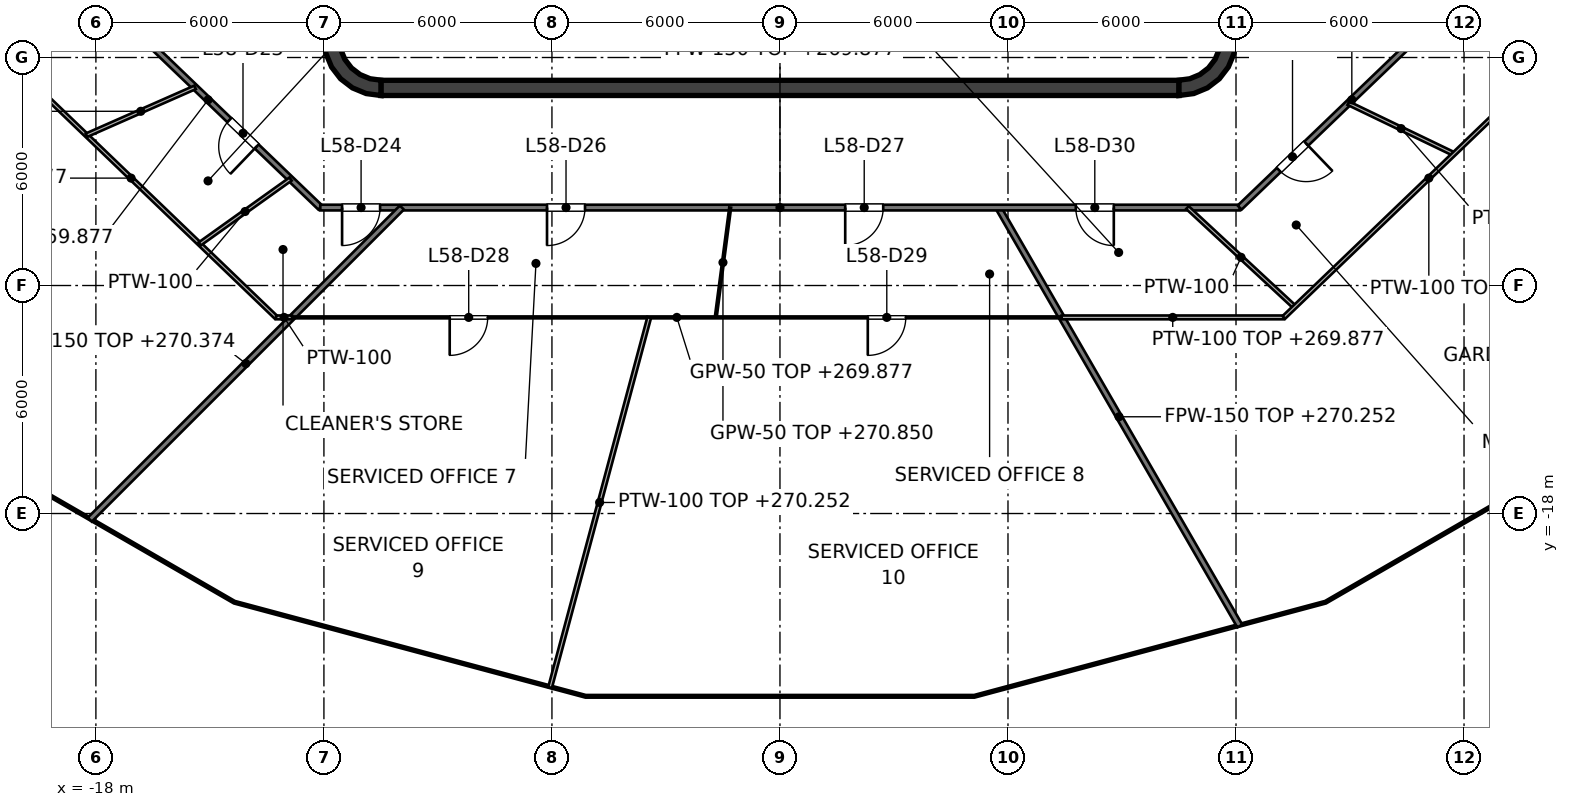
"""IFC4 building model, lengths in metres.
Left out: names, types, materials, properties, quantities, classifications, styles, units other than length and angle.
Written with IfcOpenShell. Run it as: python <this file> out.ifc"""

import sys

from ifc_helpers import new_model, si_unit, direction, frame, frame_2d, origin, place, context, subcontext, project, spatial, polyline, rectangle, outline, extrude, element, fill, save


model = new_model("IFC4")
c1 = context("Model", 3, precision=1e-05, world=origin(), true_north=direction((0.0, 1.0)))
c2 = subcontext(c1, "Body", "Model", "MODEL_VIEW")
j1 = project(units=[si_unit("LENGTHUNIT", "METRE"), si_unit("PLANEANGLEUNIT", "RADIAN")], contexts=[c1])
p1 = place(None, origin())
s1 = spatial("IfcSite", under=j1, at=p1, CompositionType="ELEMENT")
p2 = place(p1, origin())
s2 = spatial("IfcBuilding", under=s1, at=p2, CompositionType="ELEMENT")
p3 = place(p2, frame((0.0, 0.0, 267.0)))
s3 = spatial("IfcBuildingStorey", under=s2, at=p3, CompositionType="ELEMENT", Elevation=267.0)
p4 = place(p3, frame((-10.5, -6.8, 0.0), z_axis=(0.0, 0.0, 1.0), x_axis=(1.0, 0.0, 0.0)))
e1 = element("IfcWall", 1, at=p4, inside=s3, PredefinedType="SHEAR", context=c2, shape_type="SweptSolid", body=[
    extrude(rectangle(XDim=21.0, YDim=0.4, at=frame_2d((10.5, 0.0))), origin(), (0.0, 0.0, 1.0), 4.0),
])
p5 = place(p3, origin())
e2 = element("IfcWall", 2, at=p5, inside=s3, PredefinedType="SHEAR", context=c2, shape_type="SweptSolid", body=[
    extrude(outline(polyline([(-10.5, -7.0), (-10.5, -6.596), (-10.784, -6.559), (-11.048, -6.45), (-11.275, -6.275), (-11.45, -6.048), (-11.559, -5.784), (-11.596, -5.5), (-12.0, -5.5), (-11.949, -5.888), (-11.799, -6.25), (-11.561, -6.561), (-11.25, -6.799), (-10.888, -6.949), (-10.5, -7.0)])), origin(), (0.0, 0.0, 1.0), 4.0),
])
e3 = element("IfcWall", 3, at=p5, inside=s3, PredefinedType="SHEAR", context=c2, shape_type="SweptSolid", body=[
    extrude(outline(polyline([(12.0, -5.5), (11.596, -5.5), (11.559, -5.784), (11.45, -6.048), (11.275, -6.275), (11.048, -6.45), (10.784, -6.559), (10.5, -6.596), (10.5, -7.0), (10.888, -6.949), (11.25, -6.799), (11.561, -6.561), (11.799, -6.25), (11.949, -5.888), (12.0, -5.5)])), origin(), (0.0, 0.0, 1.0), 4.0),
])
p6 = place(p3, frame((1.5, -6.6, 0.0), z_axis=(0.0, 0.0, 1.0), x_axis=(0.0, 1.0, 0.0)))
e4 = element("IfcWall", 4, at=p6, inside=s3, PredefinedType="PARTITIONING", context=c2, shape_type="SweptSolid", body=[
    extrude(rectangle(XDim=2.5, YDim=0.15, at=frame_2d((1.25, 0.0))), origin(), (0.0, 0.0, 1.0), 3.85),
])
p7 = place(p6, frame((0.8, 0.0, 0.0)))
e5 = element("IfcOpeningElement", 5, at=p7, cuts=e4, PredefinedType="OPENING", context=c2, shape_type="SweptSolid", body=[
    extrude(rectangle(XDim=0.9, YDim=2.1, at=frame_2d((0.45, 1.05))), frame((0.0, 0.075, 0.0), z_axis=(0.0, -1.0, 0.0), x_axis=(1.0, 0.0, 0.0)), (0.0, 0.0, 1.0), 0.15),
])
p8 = place(p3, frame((9.0, -6.6, 0.0), z_axis=(0.0, 0.0, 1.0), x_axis=(0.0, 1.0, 0.0)))
e6 = element("IfcWall", 6, at=p8, inside=s3, PredefinedType="SOLIDWALL", context=c2, shape_type="SweptSolid", body=[
    extrude(rectangle(XDim=2.5, YDim=0.25, at=frame_2d((1.25, 0.0))), origin(), (0.0, 0.0, 1.0), 3.85),
])
p9 = place(p8, frame((0.65, 0.0, 0.0)))
e7 = element("IfcOpeningElement", 7, at=p9, cuts=e6, PredefinedType="OPENING", context=c2, shape_type="SweptSolid", body=[
    extrude(rectangle(XDim=1.2, YDim=2.1, at=frame_2d((0.6, 1.05))), frame((0.0, 0.125, 0.0), z_axis=(0.0, -1.0, 0.0), x_axis=(1.0, 0.0, 0.0)), (0.0, 0.0, 1.0), 0.25),
])
p10 = place(p3, frame((-9.0, -6.6, 0.0), z_axis=(0.0, 0.0, 1.0), x_axis=(0.0, 1.0, 0.0)))
e8 = element("IfcWall", 8, at=p10, inside=s3, PredefinedType="PARTITIONING", context=c2, shape_type="SweptSolid", body=[
    extrude(rectangle(XDim=2.5, YDim=0.25, at=frame_2d((1.25, 0.0))), origin(), (0.0, 0.0, 1.0), 3.85),
])
p11 = place(p10, frame((0.75, 0.0, 0.0)))
e9 = element("IfcOpeningElement", 9, at=p11, cuts=e8, PredefinedType="OPENING", context=c2, shape_type="SweptSolid", body=[
    extrude(rectangle(XDim=1.0, YDim=2.1, at=frame_2d((0.5, 1.05))), frame((0.0, 0.125, 0.0), z_axis=(0.0, -1.0, 0.0), x_axis=(1.0, 0.0, 0.0)), (0.0, 0.0, 1.0), 0.25),
])
p12 = place(p3, frame((3.15, -6.6, 0.0), z_axis=(0.0, 0.0, 1.0), x_axis=(0.0, 1.0, 0.0)))
e10 = element("IfcWall", 10, at=p12, inside=s3, PredefinedType="SOLIDWALL", context=c2, shape_type="SweptSolid", body=[
    extrude(rectangle(XDim=2.5, YDim=0.25, at=frame_2d((1.25, 0.0))), origin(), (0.0, 0.0, 1.0), 3.85),
])
p13 = place(p3, frame((-2.9, -6.6, 0.0), z_axis=(0.0, 0.0, 1.0), x_axis=(0.0, 1.0, 0.0)))
e11 = element("IfcWall", 11, at=p13, inside=s3, PredefinedType="PARTITIONING", context=c2, shape_type="SweptSolid", body=[
    extrude(rectangle(XDim=2.5, YDim=0.25, at=frame_2d((1.25, 0.0))), origin(), (0.0, 0.0, 1.0), 3.85),
])
p14 = place(p13, frame((0.8, 0.0, 0.0)))
e12 = element("IfcOpeningElement", 12, at=p14, cuts=e11, PredefinedType="OPENING", context=c2, shape_type="SweptSolid", body=[
    extrude(rectangle(XDim=0.9, YDim=2.1, at=frame_2d((0.45, 1.05))), frame((0.0, 0.125, 0.0), z_axis=(0.0, -1.0, 0.0), x_axis=(1.0, 0.0, 0.0)), (0.0, 0.0, 1.0), 0.25),
])
p15 = place(p3, frame((5.744, -9.949, 0.0), z_axis=(0.0, 0.0, 1.0), x_axis=(0.499937454569, -0.866061511395, 0.0)))
e13 = element("IfcWall", 13, at=p15, inside=s3, PredefinedType="PARTITIONING", context=c2, shape_type="SweptSolid", body=[
    extrude(rectangle(XDim=12.713, YDim=0.15, at=frame_2d((6.356, 0.0))), origin(), (0.0, 0.0, 1.0), 3.252),
])
p16 = place(p3, frame((-18.0, -4.278, 0.0), z_axis=(0.0, 0.0, 1.0), x_axis=(0.721290181137, -0.692633001376, 0.0)))
e14 = element("IfcWall", 14, at=p16, inside=s3, PredefinedType="PARTITIONING", context=c2, shape_type="SweptSolid", body=[
    extrude(rectangle(XDim=8.187, YDim=0.15, at=frame_2d((4.094, 0.0))), origin(), (0.0, 0.0, 1.0), 2.877),
])
p17 = place(p16, frame((4.866, 0.0, 0.0)))
e15 = element("IfcOpeningElement", 15, at=p17, cuts=e14, PredefinedType="OPENING", context=c2, shape_type="SweptSolid", body=[
    extrude(rectangle(XDim=1.0, YDim=2.1, at=frame_2d((0.5, 1.05))), frame((0.0, 0.075, 0.0), z_axis=(0.0, -1.0, 0.0), x_axis=(1.0, 0.0, 0.0)), (0.0, 0.0, 1.0), 0.15),
])
p18 = place(p3, frame((-12.095, -9.949, 0.0), z_axis=(0.0, 0.0, 1.0), x_axis=(1.0, 0.0, 0.0)))
e16 = element("IfcWall", 16, at=p18, inside=s3, PredefinedType="PARTITIONING", context=c2, shape_type="SweptSolid", body=[
    extrude(rectangle(XDim=24.19, YDim=0.15, at=frame_2d((12.095, 0.0))), origin(), (0.0, 0.0, 1.0), 2.877),
])
p19 = place(p18, frame((0.573, 0.0, 0.0)))
e17 = element("IfcOpeningElement", 17, at=p19, cuts=e16, PredefinedType="OPENING", context=c2, shape_type="SweptSolid", body=[
    extrude(rectangle(XDim=1.0, YDim=2.1, at=frame_2d((0.5, 1.05))), frame((0.0, 0.075, 0.0), z_axis=(0.0, -1.0, 0.0), x_axis=(1.0, 0.0, 0.0)), (0.0, 0.0, 1.0), 0.15),
])
p20 = place(p18, frame((5.966, 0.0, 0.0)))
e18 = element("IfcOpeningElement", 18, at=p20, cuts=e16, PredefinedType="OPENING", context=c2, shape_type="SweptSolid", body=[
    extrude(rectangle(XDim=1.0, YDim=2.1, at=frame_2d((0.5, 1.05))), frame((0.0, 0.075, 0.0), z_axis=(0.0, -1.0, 0.0), x_axis=(1.0, 0.0, 0.0)), (0.0, 0.0, 1.0), 0.15),
])
p21 = place(p18, frame((13.812, 0.0, 0.0)))
e19 = element("IfcOpeningElement", 19, at=p21, cuts=e16, PredefinedType="OPENING", context=c2, shape_type="SweptSolid", body=[
    extrude(rectangle(XDim=1.0, YDim=2.1, at=frame_2d((0.5, 1.05))), frame((0.0, 0.075, 0.0), z_axis=(0.0, -1.0, 0.0), x_axis=(1.0, 0.0, 0.0)), (0.0, 0.0, 1.0), 0.15),
])
p22 = place(p18, frame((19.879, 0.0, 0.0)))
e20 = element("IfcOpeningElement", 20, at=p22, cuts=e16, PredefinedType="OPENING", context=c2, shape_type="SweptSolid", body=[
    extrude(rectangle(XDim=1.0, YDim=2.1, at=frame_2d((0.5, 1.05))), frame((0.0, 0.075, 0.0), z_axis=(0.0, -1.0, 0.0), x_axis=(1.0, 0.0, 0.0)), (0.0, 0.0, 1.0), 0.15),
])
p23 = place(p3, frame((12.095, -9.949, 0.0), z_axis=(0.0, 0.0, 1.0), x_axis=(0.721260976692, 0.69266341285, 0.0)))
e21 = element("IfcWall", 21, at=p23, inside=s3, PredefinedType="PARTITIONING", context=c2, shape_type="SweptSolid", body=[
    extrude(rectangle(XDim=8.187, YDim=0.15, at=frame_2d((4.094, 0.0))), origin(), (0.0, 0.0, 1.0), 2.918),
])
p24 = place(p23, frame((1.43, 0.0, 0.0)))
e22 = element("IfcOpeningElement", 22, at=p24, cuts=e21, PredefinedType="OPENING", context=c2, shape_type="SweptSolid", body=[
    extrude(rectangle(XDim=1.0, YDim=2.1, at=frame_2d((0.5, 1.05))), frame((0.0, 0.075, 0.0), z_axis=(0.0, -1.0, 0.0), x_axis=(1.0, 0.0, 0.0)), (0.0, 0.0, 1.0), 0.15),
])
p25 = place(p3, frame((-18.16, -18.16, 0.0), z_axis=(0.0, 0.0, 1.0), x_axis=(0.707106781187, 0.707106781187, 0.0)))
e23 = element("IfcWall", 23, at=p25, inside=s3, PredefinedType="PARTITIONING", context=c2, shape_type="SweptSolid", body=[
    extrude(rectangle(XDim=11.612, YDim=0.15, at=frame_2d((5.806, 0.0))), origin(), (0.0, 0.0, 1.0), 3.374),
])
p26 = place(p3, frame((-12.839, -12.839, 0.0), z_axis=(0.0, 0.0, 1.0), x_axis=(1.0, 0.0, 0.0)))
e24 = element("IfcWall", 24, at=p26, inside=s3, PredefinedType="PARTITIONING", context=c2, shape_type="SweptSolid", body=[
    extrude(rectangle(XDim=20.251, YDim=0.05, at=frame_2d((10.125, 0.0))), origin(), (0.0, 0.0, 1.0), 2.877),
])
p27 = place(p26, frame((4.149, 0.0, 0.0)))
e25 = element("IfcOpeningElement", 25, at=p27, cuts=e24, PredefinedType="OPENING", context=c2, shape_type="SweptSolid", body=[
    extrude(rectangle(XDim=1.0, YDim=2.1, at=frame_2d((0.5, 1.05))), frame((0.0, 0.025, 0.0), z_axis=(0.0, -1.0, 0.0), x_axis=(1.0, 0.0, 0.0)), (0.0, 0.0, 1.0), 0.05),
])
p28 = place(p26, frame((15.15, 0.0, 0.0)))
e26 = element("IfcOpeningElement", 26, at=p28, cuts=e24, PredefinedType="OPENING", context=c2, shape_type="SweptSolid", body=[
    extrude(rectangle(XDim=1.0, YDim=2.1, at=frame_2d((0.5, 1.05))), frame((0.0, 0.025, 0.0), z_axis=(0.0, -1.0, 0.0), x_axis=(1.0, 0.0, 0.0)), (0.0, 0.0, 1.0), 0.05),
])
p29 = place(p3, frame((-1.69, -12.839, 0.0), z_axis=(0.0, 0.0, 1.0), x_axis=(0.130320186763, 0.991471960734, 0.0)))
e27 = element("IfcWall", 27, at=p29, inside=s3, PredefinedType="PARTITIONING", context=c2, shape_type="SweptSolid", body=[
    extrude(rectangle(XDim=2.915, YDim=0.05, at=frame_2d((1.458, 0.0))), origin(), (0.0, 0.0, 1.0), 3.85),
])
p30 = place(p3, frame((-20.89, -5.509, 0.0), z_axis=(0.0, 0.0, 1.0), x_axis=(0.721243919182, -0.692681174166, 0.0)))
e28 = element("IfcWall", 28, at=p30, inside=s3, PredefinedType="PARTITIONING", context=c2, shape_type="SweptSolid", body=[
    extrude(rectangle(XDim=10.582, YDim=0.1, at=frame_2d((5.291, 0.0))), origin(), (0.0, 0.0, 1.0), 2.877),
])
p31 = place(p3, frame((10.722, -9.949, 0.0), z_axis=(0.0, 0.0, 1.0), x_axis=(0.733012690733, -0.680214962511, 0.0)))
e29 = element("IfcWall", 29, at=p31, inside=s3, PredefinedType="PARTITIONING", context=c2, shape_type="SweptSolid", body=[
    extrude(rectangle(XDim=3.847, YDim=0.1, at=frame_2d((1.924, 0.0))), origin(), (0.0, 0.0, 1.0), 3.85),
])
p32 = place(p3, frame((14.955, -7.202, 0.0), z_axis=(0.0, 0.0, 1.0), x_axis=(0.900977603602, -0.433865598783, 0.0)))
e30 = element("IfcWall", 30, at=p32, inside=s3, PredefinedType="PARTITIONING", context=c2, shape_type="SweptSolid", body=[
    extrude(rectangle(XDim=3.084, YDim=0.1, at=frame_2d((1.542, 0.0))), origin(), (0.0, 0.0, 1.0), 3.85),
])
p33 = place(p3, frame((-13.258, -12.839, 0.0), z_axis=(0.0, 0.0, 1.0), x_axis=(1.0, 0.0, 0.0)))
e31 = element("IfcWall", 31, at=p33, inside=s3, PredefinedType="PARTITIONING", context=c2, shape_type="SweptSolid", body=[
    extrude(rectangle(XDim=0.419, YDim=0.1, at=frame_2d((0.209, 0.0))), origin(), (0.0, 0.0, 1.0), 3.85),
])
p34 = place(p3, frame((7.412, -12.839, 0.0), z_axis=(0.0, 0.0, 1.0), x_axis=(1.0, 0.0, 0.0)))
e32 = element("IfcWall", 32, at=p34, inside=s3, PredefinedType="PARTITIONING", context=c2, shape_type="SweptSolid", body=[
    extrude(rectangle(XDim=5.846, YDim=0.1, at=frame_2d((2.923, 0.0))), origin(), (0.0, 0.0, 1.0), 2.877),
])
p35 = place(p3, frame((-18.249, -8.046, 0.0), z_axis=(0.0, 0.0, 1.0), x_axis=(0.915015337029, 0.403419053841, 0.0)))
e33 = element("IfcWall", 33, at=p35, inside=s3, PredefinedType="PARTITIONING", context=c2, shape_type="SweptSolid", body=[
    extrude(rectangle(XDim=3.126, YDim=0.1, at=frame_2d((1.563, 0.0))), origin(), (0.0, 0.0, 1.0), 2.927),
])
p36 = place(p3, frame((-15.27, -10.907, 0.0), z_axis=(0.0, 0.0, 1.0), x_axis=(0.813789563909, 0.581159655923, 0.0)))
e34 = element("IfcWall", 34, at=p36, inside=s3, PredefinedType="PARTITIONING", context=c2, shape_type="SweptSolid", body=[
    extrude(rectangle(XDim=2.941, YDim=0.1, at=frame_2d((1.47, 0.0))), origin(), (0.0, 0.0, 1.0), 3.85),
])
p37 = place(p3, frame((13.258, -12.839, 0.0), z_axis=(0.0, 0.0, 1.0), x_axis=(0.721209796007, 0.692716702659, 0.0)))
e35 = element("IfcWall", 35, at=p37, inside=s3, PredefinedType="PARTITIONING", context=c2, shape_type="SweptSolid", body=[
    extrude(rectangle(XDim=10.582, YDim=0.1, at=frame_2d((5.291, 0.0))), origin(), (0.0, 0.0, 1.0), 2.927),
])
p38 = place(p3, frame((-6.05, -22.58, 0.0), z_axis=(0.0, 0.0, 1.0), x_axis=(0.258821194786, 0.965925250281, 0.0)))
e36 = element("IfcWall", 36, at=p38, inside=s3, PredefinedType="PARTITIONING", context=c2, shape_type="SweptSolid", body=[
    extrude(rectangle(XDim=10.085, YDim=0.1, at=frame_2d((5.042, 0.0))), origin(), (0.0, 0.0, 1.0), 3.252),
])
p39 = place(p9, origin())
e37 = element("IfcDoor", 37, at=p39, inside=s3, OperationType="SINGLE_SWING_LEFT", PredefinedType="DOOR", context=c2, shape_type="SweptSolid", body=[
    extrude(rectangle(XDim=1.2, YDim=2.1, at=frame_2d((0.6, 1.05))), frame((0.0, 0.025, 0.0), z_axis=(0.0, -1.0, 0.0), x_axis=(1.0, 0.0, 0.0)), (0.0, 0.0, 1.0), 0.05),
])
fill(e7, e37)
p40 = place(p17, origin())
e38 = element("IfcDoor", 38, at=p40, inside=s3, OperationType="SINGLE_SWING_RIGHT", PredefinedType="DOOR", context=c2, shape_type="SweptSolid", body=[
    extrude(rectangle(XDim=1.0, YDim=2.1, at=frame_2d((0.5, 1.05))), frame((0.0, 0.025, 0.0), z_axis=(0.0, -1.0, 0.0), x_axis=(1.0, 0.0, 0.0)), (0.0, 0.0, 1.0), 0.05),
])
fill(e15, e38)
p41 = place(p19, origin())
e39 = element("IfcDoor", 39, at=p41, inside=s3, OperationType="SINGLE_SWING_LEFT", PredefinedType="DOOR", context=c2, shape_type="SweptSolid", body=[
    extrude(rectangle(XDim=1.0, YDim=2.1, at=frame_2d((0.5, 1.05))), frame((0.0, 0.025, 0.0), z_axis=(0.0, -1.0, 0.0), x_axis=(1.0, 0.0, 0.0)), (0.0, 0.0, 1.0), 0.05),
])
fill(e17, e39)
p42 = place(p20, origin())
e40 = element("IfcDoor", 40, at=p42, inside=s3, OperationType="SINGLE_SWING_LEFT", PredefinedType="DOOR", context=c2, shape_type="SweptSolid", body=[
    extrude(rectangle(XDim=1.0, YDim=2.1, at=frame_2d((0.5, 1.05))), frame((0.0, 0.025, 0.0), z_axis=(0.0, -1.0, 0.0), x_axis=(1.0, 0.0, 0.0)), (0.0, 0.0, 1.0), 0.05),
])
fill(e18, e40)
p43 = place(p21, origin())
e41 = element("IfcDoor", 41, at=p43, inside=s3, OperationType="SINGLE_SWING_LEFT", PredefinedType="DOOR", context=c2, shape_type="SweptSolid", body=[
    extrude(rectangle(XDim=1.0, YDim=2.1, at=frame_2d((0.5, 1.05))), frame((0.0, 0.025, 0.0), z_axis=(0.0, -1.0, 0.0), x_axis=(1.0, 0.0, 0.0)), (0.0, 0.0, 1.0), 0.05),
])
fill(e19, e41)
p44 = place(p27, origin())
e42 = element("IfcDoor", 42, at=p44, inside=s3, OperationType="SINGLE_SWING_LEFT", PredefinedType="DOOR", context=c2, shape_type="SweptSolid", body=[
    extrude(rectangle(XDim=1.0, YDim=2.1, at=frame_2d((0.5, 1.05))), frame((0.0, 0.025, 0.0), z_axis=(0.0, -1.0, 0.0), x_axis=(1.0, 0.0, 0.0)), (0.0, 0.0, 1.0), 0.05),
])
fill(e25, e42)
p45 = place(p28, origin())
e43 = element("IfcDoor", 43, at=p45, inside=s3, OperationType="SINGLE_SWING_LEFT", PredefinedType="DOOR", context=c2, shape_type="SweptSolid", body=[
    extrude(rectangle(XDim=1.0, YDim=2.1, at=frame_2d((0.5, 1.05))), frame((0.0, 0.025, 0.0), z_axis=(0.0, -1.0, 0.0), x_axis=(1.0, 0.0, 0.0)), (0.0, 0.0, 1.0), 0.05),
])
fill(e26, e43)
p46 = place(p22, origin())
e44 = element("IfcDoor", 44, at=p46, inside=s3, OperationType="SINGLE_SWING_RIGHT", PredefinedType="DOOR", context=c2, shape_type="SweptSolid", body=[
    extrude(rectangle(XDim=1.0, YDim=2.1, at=frame_2d((0.5, 1.05))), frame((0.0, 0.025, 0.0), z_axis=(0.0, -1.0, 0.0), x_axis=(1.0, 0.0, 0.0)), (0.0, 0.0, 1.0), 0.05),
])
fill(e20, e44)
p47 = place(p24, origin())
e45 = element("IfcDoor", 45, at=p47, inside=s3, OperationType="SINGLE_SWING_RIGHT", PredefinedType="DOOR", context=c2, shape_type="SweptSolid", body=[
    extrude(rectangle(XDim=1.0, YDim=2.1, at=frame_2d((0.5, 1.05))), frame((0.0, 0.025, 0.0), z_axis=(0.0, -1.0, 0.0), x_axis=(1.0, 0.0, 0.0)), (0.0, 0.0, 1.0), 0.05),
])
fill(e22, e45)
save(model, sys.argv[1])
